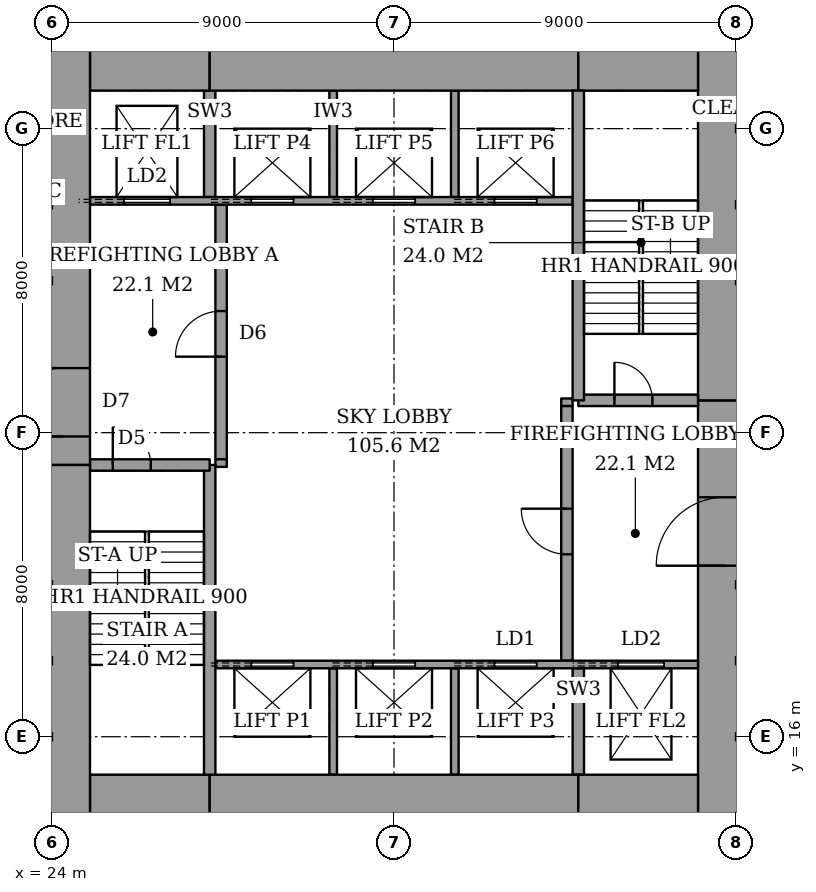
"""IFC4 building model, lengths in metres.
Left out: names, types, materials, properties, quantities, classifications, styles, units other than length and angle.
Written with IfcOpenShell. Run it as: python <this file> out.ifc"""

import sys

from ifc_helpers import new_model, si_unit, direction, frame, frame_2d, origin, place, context, subcontext, project, spatial, rectangle, extrude, element, fill, save


model = new_model("IFC4")
c1 = context("Model", 3, precision=1e-05, world=origin(), true_north=direction((0.0, 1.0)))
c2 = subcontext(c1, "Body", "Model", "MODEL_VIEW")
j1 = project(units=[si_unit("LENGTHUNIT", "METRE"), si_unit("PLANEANGLEUNIT", "RADIAN")], contexts=[c1])
p1 = place(None, origin())
s1 = spatial("IfcSite", under=j1, at=p1, CompositionType="ELEMENT")
p2 = place(p1, origin())
s2 = spatial("IfcBuilding", under=s1, at=p2, CompositionType="ELEMENT")
p3 = place(p2, frame((0.0, 0.0, 177.2)))
s3 = spatial("IfcBuildingStorey", under=s2, at=p3, CompositionType="ELEMENT", Elevation=177.2)
p4 = place(p3, frame((25.0, 14.0, 0.0), z_axis=(0.0, 0.0, 1.0), x_axis=(1.0, 0.0, 0.0)))
e1 = element("IfcWall", 1, at=p4, inside=s3, PredefinedType="SHEAR", context=c2, shape_type="SweptSolid", body=[
    extrude(rectangle(XDim=3.15, YDim=2.0, at=frame_2d((1.575, 0.0))), origin(), (0.0, 0.0, 1.0), 5.0),
])
p5 = place(p3, frame((28.15, 14.0, 0.0), z_axis=(0.0, 0.0, 1.0), x_axis=(1.0, 0.0, 0.0)))
e2 = element("IfcWall", 2, at=p5, inside=s3, PredefinedType="SHEAR", context=c2, shape_type="SweptSolid", body=[
    extrude(rectangle(XDim=9.7, YDim=2.0, at=frame_2d((4.85, 0.0))), origin(), (0.0, 0.0, 1.0), 5.0),
])
for number, where, z_axis, x_axis in (
    (3, (37.85, 14.0, 0.0), (0.0, 0.0, 1.0), (1.0, 0.0, 0.0)),
    (4, (25.0, 34.0, 0.0), (0.0, 0.0, 1.0), (1.0, 0.0, 0.0)),
):
    element("IfcWall", number, at=place(p3, frame(where, z_axis=z_axis, x_axis=x_axis)), inside=s3, PredefinedType="SHEAR", context=c2, shape_type="SweptSolid", body=[
        extrude(rectangle(XDim=3.15, YDim=2.0, at=frame_2d((1.575, 0.0))), origin(), (0.0, 0.0, 1.0), 5.0),
    ])
p6 = place(p3, frame((28.15, 34.0, 0.0), z_axis=(0.0, 0.0, 1.0), x_axis=(1.0, 0.0, 0.0)))
e5 = element("IfcWall", 5, at=p6, inside=s3, PredefinedType="SHEAR", context=c2, shape_type="SweptSolid", body=[
    extrude(rectangle(XDim=9.7, YDim=2.0, at=frame_2d((4.85, 0.0))), origin(), (0.0, 0.0, 1.0), 5.0),
])
p7 = place(p3, frame((37.85, 34.0, 0.0), z_axis=(0.0, 0.0, 1.0), x_axis=(1.0, 0.0, 0.0)))
e6 = element("IfcWall", 6, at=p7, inside=s3, PredefinedType="SHEAR", context=c2, shape_type="SweptSolid", body=[
    extrude(rectangle(XDim=3.15, YDim=2.0, at=frame_2d((1.575, 0.0))), origin(), (0.0, 0.0, 1.0), 5.0),
])
p8 = place(p3, frame((24.3, 13.0, 0.0), z_axis=(0.0, 0.0, 1.0), x_axis=(0.0, 1.0, 0.0)))
e7 = element("IfcWall", 7, at=p8, inside=s3, PredefinedType="SHEAR", context=c2, shape_type="SweptSolid", body=[
    extrude(rectangle(XDim=10.15, YDim=1.4, at=frame_2d((5.075, 0.0))), origin(), (0.0, 0.0, 1.0), 5.0),
])
p9 = place(p3, frame((24.3, 23.15, 0.0), z_axis=(0.0, 0.0, 1.0), x_axis=(0.0, 1.0, 0.0)))
e8 = element("IfcWall", 8, at=p9, inside=s3, PredefinedType="SHEAR", context=c2, shape_type="SweptSolid", body=[
    extrude(rectangle(XDim=11.85, YDim=1.4, at=frame_2d((5.925, 0.0))), origin(), (0.0, 0.0, 1.0), 5.0),
])
p10 = place(p9, frame((0.75, 0.0, 0.0)))
e9 = element("IfcOpeningElement", 9, at=p10, cuts=e8, PredefinedType="OPENING", context=c2, shape_type="SweptSolid", body=[
    extrude(rectangle(XDim=1.8, YDim=2.4, at=frame_2d((0.9, 1.2))), frame((0.0, 0.71, 0.0), z_axis=(0.0, -1.0, 0.0), x_axis=(1.0, 0.0, 0.0)), (0.0, 0.0, 1.0), 1.42),
])
p11 = place(p3, frame((41.7, 13.0, 0.0), z_axis=(0.0, 0.0, 1.0), x_axis=(0.0, 1.0, 0.0)))
e10 = element("IfcWall", 10, at=p11, inside=s3, PredefinedType="SHEAR", context=c2, shape_type="SweptSolid", body=[
    extrude(rectangle(XDim=11.85, YDim=1.4, at=frame_2d((5.925, 0.0))), origin(), (0.0, 0.0, 1.0), 5.0),
])
p12 = place(p11, frame((7.5, 0.0, 0.0)))
e11 = element("IfcOpeningElement", 11, at=p12, cuts=e10, PredefinedType="OPENING", context=c2, shape_type="SweptSolid", body=[
    extrude(rectangle(XDim=1.8, YDim=2.4, at=frame_2d((0.9, 1.2))), frame((0.0, 0.71, 0.0), z_axis=(0.0, -1.0, 0.0), x_axis=(1.0, 0.0, 0.0)), (0.0, 0.0, 1.0), 1.42),
])
p13 = place(p3, frame((41.7, 24.85, 0.0), z_axis=(0.0, 0.0, 1.0), x_axis=(0.0, 1.0, 0.0)))
e12 = element("IfcWall", 12, at=p13, inside=s3, PredefinedType="SHEAR", context=c2, shape_type="SweptSolid", body=[
    extrude(rectangle(XDim=10.15, YDim=1.4, at=frame_2d((5.075, 0.0))), origin(), (0.0, 0.0, 1.0), 5.0),
])
p14 = place(p3, frame((28.15, 15.0, 0.0), z_axis=(0.0, 0.0, 1.0), x_axis=(0.0, 1.0, 0.0)))
e13 = element("IfcWall", 13, at=p14, inside=s3, PredefinedType="SHEAR", context=c2, shape_type="SweptSolid", body=[
    extrude(rectangle(XDim=8.15, YDim=0.3, at=frame_2d((4.075, 0.0))), origin(), (0.0, 0.0, 1.0), 5.0),
])
p15 = place(p3, frame((25.0, 23.15, 0.0), z_axis=(0.0, 0.0, 1.0), x_axis=(1.0, 0.0, 0.0)))
e14 = element("IfcWall", 14, at=p15, inside=s3, PredefinedType="SHEAR", context=c2, shape_type="SweptSolid", body=[
    extrude(rectangle(XDim=3.15, YDim=0.3, at=frame_2d((1.575, 0.0))), origin(), (0.0, 0.0, 1.0), 5.0),
])
p16 = place(p15, frame((0.6, 0.0, 0.0)))
e15 = element("IfcOpeningElement", 15, at=p16, cuts=e14, PredefinedType="OPENING", context=c2, shape_type="SweptSolid", body=[
    extrude(rectangle(XDim=1.0, YDim=2.1, at=frame_2d((0.5, 1.05))), frame((0.0, 0.16, 0.0), z_axis=(0.0, -1.0, 0.0), x_axis=(1.0, 0.0, 0.0)), (0.0, 0.0, 1.0), 0.32),
])
p17 = place(p3, frame((37.85, 24.85, 0.0), z_axis=(0.0, 0.0, 1.0), x_axis=(0.0, 1.0, 0.0)))
e16 = element("IfcWall", 16, at=p17, inside=s3, PredefinedType="SHEAR", context=c2, shape_type="SweptSolid", body=[
    extrude(rectangle(XDim=8.15, YDim=0.3, at=frame_2d((4.075, 0.0))), origin(), (0.0, 0.0, 1.0), 5.0),
])
p18 = place(p3, frame((37.85, 24.85, 0.0), z_axis=(0.0, 0.0, 1.0), x_axis=(1.0, 0.0, 0.0)))
e17 = element("IfcWall", 17, at=p18, inside=s3, PredefinedType="SHEAR", context=c2, shape_type="SweptSolid", body=[
    extrude(rectangle(XDim=3.15, YDim=0.3, at=frame_2d((1.575, 0.0))), origin(), (0.0, 0.0, 1.0), 5.0),
])
p19 = place(p18, frame((0.95, 0.0, 0.0)))
e18 = element("IfcOpeningElement", 18, at=p19, cuts=e17, PredefinedType="OPENING", context=c2, shape_type="SweptSolid", body=[
    extrude(rectangle(XDim=1.0, YDim=2.1, at=frame_2d((0.5, 1.05))), frame((0.0, 0.16, 0.0), z_axis=(0.0, -1.0, 0.0), x_axis=(1.0, 0.0, 0.0)), (0.0, 0.0, 1.0), 0.32),
])
p20 = place(p3, frame((28.45, 23.3, 0.0), z_axis=(0.0, 0.0, 1.0), x_axis=(0.0, 1.0, 0.0)))
e19 = element("IfcWall", 19, at=p20, inside=s3, PredefinedType="PARTITIONING", context=c2, shape_type="SweptSolid", body=[
    extrude(rectangle(XDim=6.7, YDim=0.3, at=frame_2d((3.35, 0.0))), origin(), (0.0, 0.0, 1.0), 5.0),
])
p21 = place(p20, frame((2.7, 0.0, 0.0)))
e20 = element("IfcOpeningElement", 20, at=p21, cuts=e19, PredefinedType="OPENING", context=c2, shape_type="SweptSolid", body=[
    extrude(rectangle(XDim=1.2, YDim=2.1, at=frame_2d((0.6, 1.05))), frame((0.0, 0.16, 0.0), z_axis=(0.0, -1.0, 0.0), x_axis=(1.0, 0.0, 0.0)), (0.0, 0.0, 1.0), 0.32),
])
p22 = place(p3, frame((37.55, 18.0, 0.0), z_axis=(0.0, 0.0, 1.0), x_axis=(0.0, 1.0, 0.0)))
e21 = element("IfcWall", 21, at=p22, inside=s3, PredefinedType="PARTITIONING", context=c2, shape_type="SweptSolid", body=[
    extrude(rectangle(XDim=6.7, YDim=0.3, at=frame_2d((3.35, 0.0))), origin(), (0.0, 0.0, 1.0), 5.0),
])
p23 = place(p22, frame((2.8, 0.0, 0.0)))
e22 = element("IfcOpeningElement", 22, at=p23, cuts=e21, PredefinedType="OPENING", context=c2, shape_type="SweptSolid", body=[
    extrude(rectangle(XDim=1.2, YDim=2.1, at=frame_2d((0.6, 1.05))), frame((0.0, 0.16, 0.0), z_axis=(0.0, -1.0, 0.0), x_axis=(1.0, 0.0, 0.0)), (0.0, 0.0, 1.0), 0.32),
])
p24 = place(p3, frame((28.3, 17.9, 0.0), z_axis=(0.0, 0.0, 1.0), x_axis=(1.0, 0.0, 0.0)))
e23 = element("IfcWall", 23, at=p24, inside=s3, PredefinedType="PARTITIONING", context=c2, shape_type="SweptSolid", body=[
    extrude(rectangle(XDim=12.7, YDim=0.2, at=frame_2d((6.35, 0.0))), origin(), (0.0, 0.0, 1.0), 5.0),
])
p25 = place(p24, frame((0.95, 0.0, 0.0)))
e24 = element("IfcOpeningElement", 24, at=p25, cuts=e23, PredefinedType="OPENING", context=c2, shape_type="SweptSolid", body=[
    extrude(rectangle(XDim=1.1, YDim=2.1, at=frame_2d((0.55, 1.05))), frame((0.0, 0.11, 0.0), z_axis=(0.0, -1.0, 0.0), x_axis=(1.0, 0.0, 0.0)), (0.0, 0.0, 1.0), 0.22),
])
p26 = place(p24, frame((4.15, 0.0, 0.0)))
e25 = element("IfcOpeningElement", 25, at=p26, cuts=e23, PredefinedType="OPENING", context=c2, shape_type="SweptSolid", body=[
    extrude(rectangle(XDim=1.1, YDim=2.1, at=frame_2d((0.55, 1.05))), frame((0.0, 0.11, 0.0), z_axis=(0.0, -1.0, 0.0), x_axis=(1.0, 0.0, 0.0)), (0.0, 0.0, 1.0), 0.22),
])
p27 = place(p24, frame((7.35, 0.0, 0.0)))
e26 = element("IfcOpeningElement", 26, at=p27, cuts=e23, PredefinedType="OPENING", context=c2, shape_type="SweptSolid", body=[
    extrude(rectangle(XDim=1.1, YDim=2.1, at=frame_2d((0.55, 1.05))), frame((0.0, 0.11, 0.0), z_axis=(0.0, -1.0, 0.0), x_axis=(1.0, 0.0, 0.0)), (0.0, 0.0, 1.0), 0.22),
])
p28 = place(p24, frame((10.6, 0.0, 0.0)))
e27 = element("IfcOpeningElement", 27, at=p28, cuts=e23, PredefinedType="OPENING", context=c2, shape_type="SweptSolid", body=[
    extrude(rectangle(XDim=1.2, YDim=2.1, at=frame_2d((0.6, 1.05))), frame((0.0, 0.11, 0.0), z_axis=(0.0, -1.0, 0.0), x_axis=(1.0, 0.0, 0.0)), (0.0, 0.0, 1.0), 0.22),
])
p29 = place(p3, frame((25.0, 30.1, 0.0), z_axis=(0.0, 0.0, 1.0), x_axis=(1.0, 0.0, 0.0)))
e28 = element("IfcWall", 28, at=p29, inside=s3, PredefinedType="PARTITIONING", context=c2, shape_type="SweptSolid", body=[
    extrude(rectangle(XDim=12.7, YDim=0.2, at=frame_2d((6.35, 0.0))), origin(), (0.0, 0.0, 1.0), 5.0),
])
p30 = place(p29, frame((4.25, 0.0, 0.0)))
e29 = element("IfcOpeningElement", 29, at=p30, cuts=e28, PredefinedType="OPENING", context=c2, shape_type="SweptSolid", body=[
    extrude(rectangle(XDim=1.1, YDim=2.1, at=frame_2d((0.55, 1.05))), frame((0.0, 0.11, 0.0), z_axis=(0.0, -1.0, 0.0), x_axis=(1.0, 0.0, 0.0)), (0.0, 0.0, 1.0), 0.22),
])
p31 = place(p29, frame((7.45, 0.0, 0.0)))
e30 = element("IfcOpeningElement", 30, at=p31, cuts=e28, PredefinedType="OPENING", context=c2, shape_type="SweptSolid", body=[
    extrude(rectangle(XDim=1.1, YDim=2.1, at=frame_2d((0.55, 1.05))), frame((0.0, 0.11, 0.0), z_axis=(0.0, -1.0, 0.0), x_axis=(1.0, 0.0, 0.0)), (0.0, 0.0, 1.0), 0.22),
])
p32 = place(p29, frame((10.65, 0.0, 0.0)))
e31 = element("IfcOpeningElement", 31, at=p32, cuts=e28, PredefinedType="OPENING", context=c2, shape_type="SweptSolid", body=[
    extrude(rectangle(XDim=1.1, YDim=2.1, at=frame_2d((0.55, 1.05))), frame((0.0, 0.11, 0.0), z_axis=(0.0, -1.0, 0.0), x_axis=(1.0, 0.0, 0.0)), (0.0, 0.0, 1.0), 0.22),
])
p33 = place(p29, frame((0.9, 0.0, 0.0)))
e32 = element("IfcOpeningElement", 32, at=p33, cuts=e28, PredefinedType="OPENING", context=c2, shape_type="SweptSolid", body=[
    extrude(rectangle(XDim=1.2, YDim=2.1, at=frame_2d((0.6, 1.05))), frame((0.0, 0.11, 0.0), z_axis=(0.0, -1.0, 0.0), x_axis=(1.0, 0.0, 0.0)), (0.0, 0.0, 1.0), 0.22),
])
for number, where, z_axis, x_axis in (
    (33, (31.4, 15.0, 0.0), (0.0, 0.0, 1.0), (0.0, 1.0, 0.0)),
    (34, (34.6, 15.0, 0.0), (0.0, 0.0, 1.0), (0.0, 1.0, 0.0)),
):
    element("IfcWall", number, at=place(p3, frame(where, z_axis=z_axis, x_axis=x_axis)), inside=s3, PredefinedType="PARTITIONING", context=c2, shape_type="SweptSolid", body=[
        extrude(rectangle(XDim=2.8, YDim=0.2, at=frame_2d((1.4, 0.0))), origin(), (0.0, 0.0, 1.0), 5.0),
    ])
p34 = place(p3, frame((37.85, 15.0, 0.0), z_axis=(0.0, 0.0, 1.0), x_axis=(0.0, 1.0, 0.0)))
e35 = element("IfcWall", 35, at=p34, inside=s3, PredefinedType="SHEAR", context=c2, shape_type="SweptSolid", body=[
    extrude(rectangle(XDim=2.8, YDim=0.3, at=frame_2d((1.4, 0.0))), origin(), (0.0, 0.0, 1.0), 5.0),
])
for number, where, z_axis, x_axis in (
    (36, (31.4, 30.2, 0.0), (0.0, 0.0, 1.0), (0.0, 1.0, 0.0)),
    (37, (34.6, 30.2, 0.0), (0.0, 0.0, 1.0), (0.0, 1.0, 0.0)),
):
    element("IfcWall", number, at=place(p3, frame(where, z_axis=z_axis, x_axis=x_axis)), inside=s3, PredefinedType="PARTITIONING", context=c2, shape_type="SweptSolid", body=[
        extrude(rectangle(XDim=2.8, YDim=0.2, at=frame_2d((1.4, 0.0))), origin(), (0.0, 0.0, 1.0), 5.0),
    ])
p35 = place(p3, frame((28.15, 30.2, 0.0), z_axis=(0.0, 0.0, 1.0), x_axis=(0.0, 1.0, 0.0)))
e38 = element("IfcWall", 38, at=p35, inside=s3, PredefinedType="SHEAR", context=c2, shape_type="SweptSolid", body=[
    extrude(rectangle(XDim=2.8, YDim=0.3, at=frame_2d((1.4, 0.0))), origin(), (0.0, 0.0, 1.0), 5.0),
])
for number, where, z_axis, x_axis in (
    (39, (28.3, 23.2, 0.0), (0.0, 0.0, 1.0), (1.0, 0.0, 0.0)),
    (40, (37.4, 24.8, 0.0), (0.0, 0.0, 1.0), (1.0, 0.0, 0.0)),
):
    element("IfcWall", number, at=place(p3, frame(where, z_axis=z_axis, x_axis=x_axis)), inside=s3, PredefinedType="PARTITIONING", context=c2, shape_type="SweptSolid", body=[
        extrude(rectangle(XDim=0.3, YDim=0.2, at=frame_2d((0.15, 0.0))), origin(), (0.0, 0.0, 1.0), 5.0),
    ])
p36 = place(p16, origin())
e41 = element("IfcDoor", 41, at=p36, inside=s3, OperationType="SINGLE_SWING_RIGHT", PredefinedType="DOOR", context=c2, shape_type="SweptSolid", body=[
    extrude(rectangle(XDim=1.0, YDim=2.1, at=frame_2d((0.5, 1.05))), frame((0.0, 0.025, 0.0), z_axis=(0.0, -1.0, 0.0), x_axis=(1.0, 0.0, 0.0)), (0.0, 0.0, 1.0), 0.05),
])
fill(e15, e41)
p37 = place(p19, origin())
e42 = element("IfcDoor", 42, at=p37, inside=s3, OperationType="SINGLE_SWING_RIGHT", PredefinedType="DOOR", context=c2, shape_type="SweptSolid", body=[
    extrude(rectangle(XDim=1.0, YDim=2.1, at=frame_2d((0.5, 1.05))), frame((0.0, 0.025, 0.0), z_axis=(0.0, -1.0, 0.0), x_axis=(1.0, 0.0, 0.0)), (0.0, 0.0, 1.0), 0.05),
])
fill(e18, e42)
p38 = place(p21, origin())
e43 = element("IfcDoor", 43, at=p38, inside=s3, OperationType="SINGLE_SWING_RIGHT", PredefinedType="DOOR", context=c2, shape_type="SweptSolid", body=[
    extrude(rectangle(XDim=1.2, YDim=2.1, at=frame_2d((0.6, 1.05))), frame((0.0, 0.025, 0.0), z_axis=(0.0, -1.0, 0.0), x_axis=(1.0, 0.0, 0.0)), (0.0, 0.0, 1.0), 0.05),
])
fill(e20, e43)
p39 = place(p23, origin())
e44 = element("IfcDoor", 44, at=p39, inside=s3, OperationType="SINGLE_SWING_LEFT", PredefinedType="DOOR", context=c2, shape_type="SweptSolid", body=[
    extrude(rectangle(XDim=1.2, YDim=2.1, at=frame_2d((0.6, 1.05))), frame((0.0, 0.025, 0.0), z_axis=(0.0, -1.0, 0.0), x_axis=(1.0, 0.0, 0.0)), (0.0, 0.0, 1.0), 0.05),
])
fill(e22, e44)
p40 = place(p10, origin())
e45 = element("IfcDoor", 45, at=p40, inside=s3, OperationType="DOUBLE_DOOR_DOUBLE_SWING", PredefinedType="DOOR", context=c2, shape_type="SweptSolid", body=[
    extrude(rectangle(XDim=1.8, YDim=2.4, at=frame_2d((0.9, 1.2))), frame((0.0, 0.025, 0.0), z_axis=(0.0, -1.0, 0.0), x_axis=(1.0, 0.0, 0.0)), (0.0, 0.0, 1.0), 0.05),
])
fill(e9, e45)
p41 = place(p12, origin())
e46 = element("IfcDoor", 46, at=p41, inside=s3, OperationType="DOUBLE_DOOR_DOUBLE_SWING", PredefinedType="DOOR", context=c2, shape_type="SweptSolid", body=[
    extrude(rectangle(XDim=1.8, YDim=2.4, at=frame_2d((0.9, 1.2))), frame((0.0, 0.025, 0.0), z_axis=(0.0, -1.0, 0.0), x_axis=(1.0, 0.0, 0.0)), (0.0, 0.0, 1.0), 0.05),
])
fill(e11, e46)
p42 = place(p25, origin())
e47 = element("IfcDoor", 47, at=p42, inside=s3, OperationType="SLIDING_TO_LEFT", PredefinedType="DOOR", context=c2, shape_type="SweptSolid", body=[
    extrude(rectangle(XDim=1.1, YDim=2.1, at=frame_2d((0.55, 1.05))), frame((0.0, 0.025, 0.0), z_axis=(0.0, -1.0, 0.0), x_axis=(1.0, 0.0, 0.0)), (0.0, 0.0, 1.0), 0.05),
])
fill(e24, e47)
p43 = place(p26, origin())
e48 = element("IfcDoor", 48, at=p43, inside=s3, OperationType="SLIDING_TO_LEFT", PredefinedType="DOOR", context=c2, shape_type="SweptSolid", body=[
    extrude(rectangle(XDim=1.1, YDim=2.1, at=frame_2d((0.55, 1.05))), frame((0.0, 0.025, 0.0), z_axis=(0.0, -1.0, 0.0), x_axis=(1.0, 0.0, 0.0)), (0.0, 0.0, 1.0), 0.05),
])
fill(e25, e48)
p44 = place(p27, origin())
e49 = element("IfcDoor", 49, at=p44, inside=s3, OperationType="SLIDING_TO_LEFT", PredefinedType="DOOR", context=c2, shape_type="SweptSolid", body=[
    extrude(rectangle(XDim=1.1, YDim=2.1, at=frame_2d((0.55, 1.05))), frame((0.0, 0.025, 0.0), z_axis=(0.0, -1.0, 0.0), x_axis=(1.0, 0.0, 0.0)), (0.0, 0.0, 1.0), 0.05),
])
fill(e26, e49)
p45 = place(p30, origin())
e50 = element("IfcDoor", 50, at=p45, inside=s3, OperationType="SLIDING_TO_LEFT", PredefinedType="DOOR", context=c2, shape_type="SweptSolid", body=[
    extrude(rectangle(XDim=1.1, YDim=2.1, at=frame_2d((0.55, 1.05))), frame((0.0, 0.025, 0.0), z_axis=(0.0, -1.0, 0.0), x_axis=(1.0, 0.0, 0.0)), (0.0, 0.0, 1.0), 0.05),
])
fill(e29, e50)
p46 = place(p31, origin())
e51 = element("IfcDoor", 51, at=p46, inside=s3, OperationType="SLIDING_TO_LEFT", PredefinedType="DOOR", context=c2, shape_type="SweptSolid", body=[
    extrude(rectangle(XDim=1.1, YDim=2.1, at=frame_2d((0.55, 1.05))), frame((0.0, 0.025, 0.0), z_axis=(0.0, -1.0, 0.0), x_axis=(1.0, 0.0, 0.0)), (0.0, 0.0, 1.0), 0.05),
])
fill(e30, e51)
p47 = place(p32, origin())
e52 = element("IfcDoor", 52, at=p47, inside=s3, OperationType="SLIDING_TO_LEFT", PredefinedType="DOOR", context=c2, shape_type="SweptSolid", body=[
    extrude(rectangle(XDim=1.1, YDim=2.1, at=frame_2d((0.55, 1.05))), frame((0.0, 0.025, 0.0), z_axis=(0.0, -1.0, 0.0), x_axis=(1.0, 0.0, 0.0)), (0.0, 0.0, 1.0), 0.05),
])
fill(e31, e52)
p48 = place(p33, origin())
e53 = element("IfcDoor", 53, at=p48, inside=s3, OperationType="SLIDING_TO_LEFT", PredefinedType="DOOR", context=c2, shape_type="SweptSolid", body=[
    extrude(rectangle(XDim=1.2, YDim=2.1, at=frame_2d((0.6, 1.05))), frame((0.0, 0.025, 0.0), z_axis=(0.0, -1.0, 0.0), x_axis=(1.0, 0.0, 0.0)), (0.0, 0.0, 1.0), 0.05),
])
fill(e32, e53)
p49 = place(p28, origin())
e54 = element("IfcDoor", 54, at=p49, inside=s3, OperationType="SLIDING_TO_LEFT", PredefinedType="DOOR", context=c2, shape_type="SweptSolid", body=[
    extrude(rectangle(XDim=1.2, YDim=2.1, at=frame_2d((0.6, 1.05))), frame((0.0, 0.025, 0.0), z_axis=(0.0, -1.0, 0.0), x_axis=(1.0, 0.0, 0.0)), (0.0, 0.0, 1.0), 0.05),
])
fill(e27, e54)
save(model, sys.argv[1])
